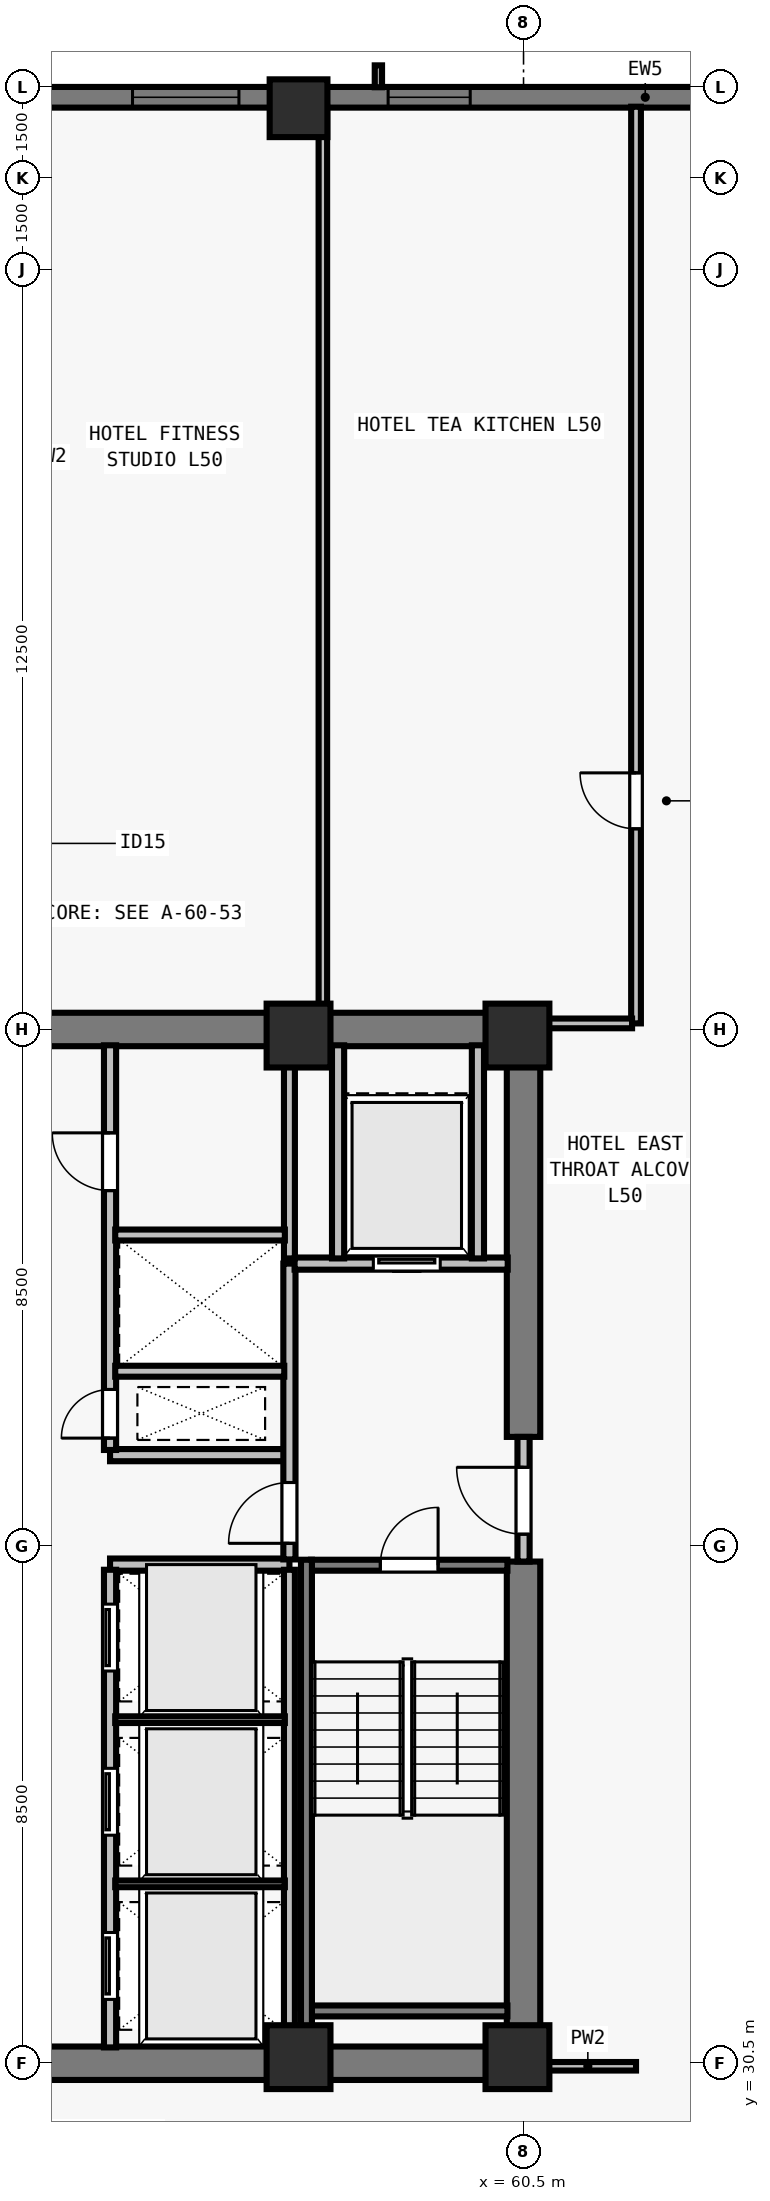
"""IFC4 building model, lengths in metres.
Left out: names, types, materials, properties, quantities, classifications, styles, units other than length and angle.
Written with IfcOpenShell. Run it as: python <this file> out.ifc"""

import sys

from ifc_helpers import new_model, si_unit, direction, frame, frame_2d, origin, origin_2d, place, context, subcontext, project, spatial, rectangle, extrude, element, fill, save


model = new_model("IFC4")
c1 = context("Model", 3, precision=1e-05, world=origin(), true_north=direction((0.0, 1.0)))
c2 = subcontext(c1, "Body", "Model", "MODEL_VIEW")
j1 = project(units=[si_unit("LENGTHUNIT", "METRE"), si_unit("PLANEANGLEUNIT", "RADIAN")], contexts=[c1])
p1 = place(None, origin())
s1 = spatial("IfcSite", under=j1, at=p1, CompositionType="ELEMENT")
p2 = place(p1, origin())
s2 = spatial("IfcBuilding", under=s1, at=p2, CompositionType="ELEMENT")
p3 = place(p2, frame((0.0, 0.0, 183.0)))
s3 = spatial("IfcBuildingStorey", under=s2, at=p3, CompositionType="ELEMENT", Elevation=183.0)
for number, where, z_axis, x_axis in (
    (1, (56.8, 30.6, 0.0), (0.0, 0.0, 1.0), (1.0, 0.0, 0.0)),
    (2, (60.4, 30.6, 0.0), (0.0, 0.0, 1.0), (1.0, 0.0, 0.0)),
    (3, (56.8, 47.4, 0.0), (0.0, 0.0, 1.0), (1.0, 0.0, 0.0)),
    (4, (60.4, 47.4, 0.0), (0.0, 0.0, 1.0), (1.0, 0.0, 0.0)),
):
    element("IfcColumn", number, at=place(p3, frame(where, z_axis=z_axis, x_axis=x_axis)), inside=s3, PredefinedType="COLUMN", context=c2, shape_type="SweptSolid", body=[
        extrude(rectangle(XDim=1.05, YDim=1.05, at=origin_2d()), origin(), (0.0, 0.0, 1.0), 3.5),
    ])
p4 = place(p3, frame((56.8, 62.65, 0.0), z_axis=(0.0, 0.0, 1.0), x_axis=(1.0, 0.0, 0.0)))
e5 = element("IfcColumn", 5, at=p4, inside=s3, PredefinedType="COLUMN", context=c2, shape_type="SweptSolid", body=[
    extrude(rectangle(XDim=0.95, YDim=0.95, at=origin_2d()), origin(), (0.0, 0.0, 1.0), 3.5),
])
p5 = place(p3, frame((32.0, 62.83, 0.0), z_axis=(0.0, 0.0, 1.0), x_axis=(1.0, 0.0, 0.0)))
e6 = element("IfcWall", 6, at=p5, inside=s3, PredefinedType="SOLIDWALL", context=c2, shape_type="SweptSolid", body=[
    extrude(rectangle(XDim=39.682, YDim=0.34, at=frame_2d((19.841, 0.0))), origin(), (0.0, 0.0, 1.0), 3.28),
])
p6 = place(p5, frame((4.102, 0.0, 0.8)))
e7 = element("IfcOpeningElement", 7, at=p6, cuts=e6, PredefinedType="OPENING", context=c2, shape_type="SweptSolid", body=[
    extrude(rectangle(XDim=1.35, YDim=1.66, at=frame_2d((0.675, 0.83))), frame((0.0, 0.18, 0.0), z_axis=(0.0, -1.0, 0.0), x_axis=(1.0, 0.0, 0.0)), (0.0, 0.0, 1.0), 0.36),
])
p7 = place(p5, frame((8.755, 0.0, 0.8)))
e8 = element("IfcOpeningElement", 8, at=p7, cuts=e6, PredefinedType="OPENING", context=c2, shape_type="SweptSolid", body=[
    extrude(rectangle(XDim=1.75, YDim=1.66, at=frame_2d((0.875, 0.83))), frame((0.0, 0.18, 0.0), z_axis=(0.0, -1.0, 0.0), x_axis=(1.0, 0.0, 0.0)), (0.0, 0.0, 1.0), 0.36),
])
p8 = place(p5, frame((12.059, 0.0, 0.8)))
e9 = element("IfcOpeningElement", 9, at=p8, cuts=e6, PredefinedType="OPENING", context=c2, shape_type="SweptSolid", body=[
    extrude(rectangle(XDim=1.35, YDim=1.66, at=frame_2d((0.675, 0.83))), frame((0.0, 0.18, 0.0), z_axis=(0.0, -1.0, 0.0), x_axis=(1.0, 0.0, 0.0)), (0.0, 0.0, 1.0), 0.36),
])
p9 = place(p5, frame((16.262, 0.0, 0.8)))
e10 = element("IfcOpeningElement", 10, at=p9, cuts=e6, PredefinedType="OPENING", context=c2, shape_type="SweptSolid", body=[
    extrude(rectangle(XDim=1.75, YDim=1.66, at=frame_2d((0.875, 0.83))), frame((0.0, 0.18, 0.0), z_axis=(0.0, -1.0, 0.0), x_axis=(1.0, 0.0, 0.0)), (0.0, 0.0, 1.0), 0.36),
])
p10 = place(p5, frame((18.316, 0.0, 0.8)))
e11 = element("IfcOpeningElement", 11, at=p10, cuts=e6, PredefinedType="OPENING", context=c2, shape_type="SweptSolid", body=[
    extrude(rectangle(XDim=1.35, YDim=1.66, at=frame_2d((0.675, 0.83))), frame((0.0, 0.18, 0.0), z_axis=(0.0, -1.0, 0.0), x_axis=(1.0, 0.0, 0.0)), (0.0, 0.0, 1.0), 0.36),
])
p11 = place(p5, frame((22.07, 0.0, 0.8)))
e12 = element("IfcOpeningElement", 12, at=p11, cuts=e6, PredefinedType="OPENING", context=c2, shape_type="SweptSolid", body=[
    extrude(rectangle(XDim=1.75, YDim=1.66, at=frame_2d((0.875, 0.83))), frame((0.0, 0.18, 0.0), z_axis=(0.0, -1.0, 0.0), x_axis=(1.0, 0.0, 0.0)), (0.0, 0.0, 1.0), 0.36),
])
p12 = place(p5, frame((26.273, 0.0, 0.8)))
e13 = element("IfcOpeningElement", 13, at=p12, cuts=e6, PredefinedType="OPENING", context=c2, shape_type="SweptSolid", body=[
    extrude(rectangle(XDim=1.35, YDim=1.66, at=frame_2d((0.675, 0.83))), frame((0.0, 0.18, 0.0), z_axis=(0.0, -1.0, 0.0), x_axis=(1.0, 0.0, 0.0)), (0.0, 0.0, 1.0), 0.36),
])
p13 = place(p5, frame((33.38, 0.0, 0.8)))
e14 = element("IfcOpeningElement", 14, at=p13, cuts=e6, PredefinedType="OPENING", context=c2, shape_type="SweptSolid", body=[
    extrude(rectangle(XDim=1.35, YDim=1.66, at=frame_2d((0.675, 0.83))), frame((0.0, 0.18, 0.0), z_axis=(0.0, -1.0, 0.0), x_axis=(1.0, 0.0, 0.0)), (0.0, 0.0, 1.0), 0.36),
])
for number, where, z_axis, x_axis in (
    (15, (43.225, 30.5, 0.0), (0.0, 0.0, 1.0), (1.0, 0.0, 0.0)),
    (16, (43.225, 47.5, 0.0), (0.0, 0.0, 1.0), (1.0, 0.0, 0.0)),
):
    element("IfcWall", number, at=place(p3, frame(where, z_axis=z_axis, x_axis=x_axis)), inside=s3, PredefinedType="SHEAR", context=c2, shape_type="SweptSolid", body=[
        extrude(rectangle(XDim=17.55, YDim=0.55, at=frame_2d((8.775, 0.0))), origin(), (0.0, 0.0, 1.0), 3.28),
    ])
p14 = place(p3, frame((60.5, 30.765, 0.0), z_axis=(0.0, 0.0, 1.0), x_axis=(0.0, 1.0, 0.0)))
e17 = element("IfcWall", 17, at=p14, inside=s3, PredefinedType="SHEAR", context=c2, shape_type="SweptSolid", body=[
    extrude(rectangle(XDim=7.985, YDim=0.55, at=frame_2d((3.993, 0.0))), origin(), (0.0, 0.0, 1.0), 3.28),
])
p15 = place(p3, frame((60.5, 40.8, 0.0), z_axis=(0.0, 0.0, 1.0), x_axis=(0.0, 1.0, 0.0)))
e18 = element("IfcWall", 18, at=p15, inside=s3, PredefinedType="SHEAR", context=c2, shape_type="SweptSolid", body=[
    extrude(rectangle(XDim=6.435, YDim=0.55, at=frame_2d((3.218, 0.0))), origin(), (0.0, 0.0, 1.0), 3.28),
])
for number, where, z_axis, x_axis in (
    (19, (53.7, 38.7, 0.0), (0.0, 0.0, 1.0), (1.0, 0.0, 0.0)),
    (20, (53.7, 40.5, 0.0), (0.0, 0.0, 1.0), (1.0, 0.0, 0.0)),
):
    element("IfcWall", number, at=place(p3, frame(where, z_axis=z_axis, x_axis=x_axis)), inside=s3, PredefinedType="SOLIDWALL", context=c2, shape_type="SweptSolid", body=[
        extrude(rectangle(XDim=2.95, YDim=0.2, at=frame_2d((1.475, 0.0))), origin(), (0.0, 0.0, 1.0), 3.28),
    ])
p16 = place(p3, frame((53.7, 30.76, 0.0), z_axis=(0.0, 0.0, 1.0), x_axis=(0.0, 1.0, 0.0)))
e21 = element("IfcWall", 21, at=p16, inside=s3, PredefinedType="SOLIDWALL", context=c2, shape_type="SweptSolid", body=[
    extrude(rectangle(XDim=7.855, YDim=0.2, at=frame_2d((3.927, 0.0))), origin(), (0.0, 0.0, 1.0), 3.28),
])
p17 = place(p16, frame((0.79, 0.0, 0.0)))
e22 = element("IfcOpeningElement", 22, at=p17, cuts=e21, PredefinedType="OPENING", context=c2, shape_type="SweptSolid", body=[
    extrude(rectangle(XDim=1.1, YDim=2.2, at=frame_2d((0.55, 1.1))), frame((0.0, 0.11, 0.0), z_axis=(0.0, -1.0, 0.0), x_axis=(1.0, 0.0, 0.0)), (0.0, 0.0, 1.0), 0.22),
])
p18 = place(p16, frame((3.49, 0.0, 0.0)))
e23 = element("IfcOpeningElement", 23, at=p18, cuts=e21, PredefinedType="OPENING", context=c2, shape_type="SweptSolid", body=[
    extrude(rectangle(XDim=1.1, YDim=2.2, at=frame_2d((0.55, 1.1))), frame((0.0, 0.11, 0.0), z_axis=(0.0, -1.0, 0.0), x_axis=(1.0, 0.0, 0.0)), (0.0, 0.0, 1.0), 0.22),
])
p19 = place(p16, frame((6.19, 0.0, 0.0)))
e24 = element("IfcOpeningElement", 24, at=p19, cuts=e21, PredefinedType="OPENING", context=c2, shape_type="SweptSolid", body=[
    extrude(rectangle(XDim=1.1, YDim=2.2, at=frame_2d((0.55, 1.1))), frame((0.0, 0.11, 0.0), z_axis=(0.0, -1.0, 0.0), x_axis=(1.0, 0.0, 0.0)), (0.0, 0.0, 1.0), 0.22),
])
p20 = place(p3, frame((53.7, 40.585, 0.0), z_axis=(0.0, 0.0, 1.0), x_axis=(0.0, 1.0, 0.0)))
e25 = element("IfcWall", 25, at=p20, inside=s3, PredefinedType="SOLIDWALL", context=c2, shape_type="SweptSolid", body=[
    extrude(rectangle(XDim=6.655, YDim=0.2, at=frame_2d((3.328, 0.0))), origin(), (0.0, 0.0, 1.0), 3.28),
])
p21 = place(p20, frame((0.195, 0.0, 0.0)))
e26 = element("IfcOpeningElement", 26, at=p21, cuts=e25, PredefinedType="OPENING", context=c2, shape_type="SweptSolid", body=[
    extrude(rectangle(XDim=0.8, YDim=2.08, at=frame_2d((0.4, 1.04))), frame((0.0, 0.11, 0.0), z_axis=(0.0, -1.0, 0.0), x_axis=(1.0, 0.0, 0.0)), (0.0, 0.0, 1.0), 0.22),
])
p22 = place(p20, frame((4.265, 0.0, 0.0)))
e27 = element("IfcOpeningElement", 27, at=p22, cuts=e25, PredefinedType="OPENING", context=c2, shape_type="SweptSolid", body=[
    extrude(rectangle(XDim=0.95, YDim=2.12, at=frame_2d((0.475, 1.06))), frame((0.0, 0.11, 0.0), z_axis=(0.0, -1.0, 0.0), x_axis=(1.0, 0.0, 0.0)), (0.0, 0.0, 1.0), 0.22),
])
p23 = place(p3, frame((60.5, 38.75, 0.0), z_axis=(0.0, 0.0, 1.0), x_axis=(0.0, 1.0, 0.0)))
e28 = element("IfcWall", 28, at=p23, inside=s3, PredefinedType="SOLIDWALL", context=c2, shape_type="SweptSolid", body=[
    extrude(rectangle(XDim=2.05, YDim=0.2, at=frame_2d((1.025, 0.0))), origin(), (0.0, 0.0, 1.0), 3.28),
])
p24 = place(p23, frame((0.45, 0.0, 0.0)))
e29 = element("IfcOpeningElement", 29, at=p24, cuts=e28, PredefinedType="OPENING", context=c2, shape_type="SweptSolid", body=[
    extrude(rectangle(XDim=1.1, YDim=2.15, at=frame_2d((0.55, 1.075))), frame((0.0, 0.11, 0.0), z_axis=(0.0, -1.0, 0.0), x_axis=(1.0, 0.0, 0.0)), (0.0, 0.0, 1.0), 0.22),
])
p25 = place(p3, frame((56.65, 38.785, 0.0), z_axis=(0.0, 0.0, 1.0), x_axis=(0.0, 1.0, 0.0)))
e30 = element("IfcWall", 30, at=p25, inside=s3, PredefinedType="SOLIDWALL", context=c2, shape_type="SweptSolid", body=[
    extrude(rectangle(XDim=4.865, YDim=0.2, at=frame_2d((2.433, 0.0))), origin(), (0.0, 0.0, 1.0), 3.28),
])
p26 = place(p25, frame((0.265, 0.0, 0.0)))
e31 = element("IfcOpeningElement", 31, at=p26, cuts=e30, PredefinedType="OPENING", context=c2, shape_type="SweptSolid", body=[
    extrude(rectangle(XDim=1.0, YDim=2.15, at=frame_2d((0.5, 1.075))), frame((0.0, 0.11, 0.0), z_axis=(0.0, -1.0, 0.0), x_axis=(1.0, 0.0, 0.0)), (0.0, 0.0, 1.0), 0.22),
])
p27 = place(p3, frame((56.735, 43.65, 0.0), z_axis=(0.0, 0.0, 1.0), x_axis=(1.0, 0.0, 0.0)))
e32 = element("IfcWall", 32, at=p27, inside=s3, PredefinedType="SOLIDWALL", context=c2, shape_type="SweptSolid", body=[
    extrude(rectangle(XDim=3.505, YDim=0.2, at=frame_2d((1.752, 0.0))), origin(), (0.0, 0.0, 1.0), 3.28),
])
p28 = place(p27, frame((1.295, 0.0, 0.0)))
e33 = element("IfcOpeningElement", 33, at=p28, cuts=e32, PredefinedType="OPENING", context=c2, shape_type="SweptSolid", body=[
    extrude(rectangle(XDim=1.1, YDim=2.2, at=frame_2d((0.55, 1.1))), frame((0.0, 0.11, 0.0), z_axis=(0.0, -1.0, 0.0), x_axis=(1.0, 0.0, 0.0)), (0.0, 0.0, 1.0), 0.22),
])
for number, where, z_axis, x_axis in (
    (34, (57.45, 43.735, 0.0), (0.0, 0.0, 1.0), (0.0, 1.0, 0.0)),
    (35, (59.75, 43.735, 0.0), (0.0, 0.0, 1.0), (0.0, 1.0, 0.0)),
):
    element("IfcWall", number, at=place(p3, frame(where, z_axis=z_axis, x_axis=x_axis)), inside=s3, PredefinedType="SOLIDWALL", context=c2, shape_type="SweptSolid", body=[
        extrude(rectangle(XDim=3.505, YDim=0.2, at=frame_2d((1.752, 0.0))), origin(), (0.0, 0.0, 1.0), 3.28),
    ])
p29 = place(p3, frame((56.65, 30.76, 0.0), z_axis=(0.0, 0.0, 1.0), x_axis=(0.0, 1.0, 0.0)))
e36 = element("IfcWall", 36, at=p29, inside=s3, PredefinedType="SOLIDWALL", context=c2, shape_type="SweptSolid", body=[
    extrude(rectangle(XDim=7.855, YDim=0.18, at=frame_2d((3.927, 0.0))), origin(), (0.0, 0.0, 1.0), 3.28),
])
for number, where, z_axis, x_axis in (
    (37, (53.785, 33.45, 0.0), (0.0, 0.0, 1.0), (1.0, 0.0, 0.0)),
    (38, (53.785, 36.15, 0.0), (0.0, 0.0, 1.0), (1.0, 0.0, 0.0)),
):
    element("IfcWall", number, at=place(p3, frame(where, z_axis=z_axis, x_axis=x_axis)), inside=s3, PredefinedType="PARTITIONING", context=c2, shape_type="SweptSolid", body=[
        extrude(rectangle(XDim=2.79, YDim=0.11, at=frame_2d((1.395, 0.0))), origin(), (0.0, 0.0, 1.0), 3.28),
    ])
p30 = place(p3, frame((56.65, 43.735, 0.0), z_axis=(0.0, 0.0, 1.0), x_axis=(0.0, 1.0, 0.0)))
e39 = element("IfcWall", 39, at=p30, inside=s3, PredefinedType="SOLIDWALL", context=c2, shape_type="SweptSolid", body=[
    extrude(rectangle(XDim=3.505, YDim=0.18, at=frame_2d((1.752, 0.0))), origin(), (0.0, 0.0, 1.0), 3.28),
])
p31 = place(p3, frame((53.785, 41.88, 0.0), z_axis=(0.0, 0.0, 1.0), x_axis=(1.0, 0.0, 0.0)))
e40 = element("IfcWall", 40, at=p31, inside=s3, PredefinedType="SOLIDWALL", context=c2, shape_type="SweptSolid", body=[
    extrude(rectangle(XDim=2.78, YDim=0.18, at=frame_2d((1.39, 0.0))), origin(), (0.0, 0.0, 1.0), 3.28),
])
p32 = place(p3, frame((53.785, 44.12, 0.0), z_axis=(0.0, 0.0, 1.0), x_axis=(1.0, 0.0, 0.0)))
e41 = element("IfcWall", 41, at=p32, inside=s3, PredefinedType="SOLIDWALL", context=c2, shape_type="SweptSolid", body=[
    extrude(rectangle(XDim=2.79, YDim=0.18, at=frame_2d((1.395, 0.0))), origin(), (0.0, 0.0, 1.0), 3.28),
])
p33 = place(p3, frame((62.35, 47.6, 0.0), z_axis=(0.0, 0.0, 1.0), x_axis=(0.0, 1.0, 0.0)))
e42 = element("IfcWall", 42, at=p33, inside=s3, PredefinedType="PARTITIONING", context=c2, shape_type="SweptSolid", body=[
    extrude(rectangle(XDim=15.075, YDim=0.16, at=frame_2d((7.538, 0.0))), origin(), (0.0, 0.0, 1.0), 2.555),
])
p34 = place(p33, frame((3.2, 0.0, 0.0)))
e43 = element("IfcOpeningElement", 43, at=p34, cuts=e42, PredefinedType="OPENING", context=c2, shape_type="SweptSolid", body=[
    extrude(rectangle(XDim=0.92, YDim=2.12, at=frame_2d((0.46, 1.06))), frame((0.0, 0.09, 0.0), z_axis=(0.0, -1.0, 0.0), x_axis=(1.0, 0.0, 0.0)), (0.0, 0.0, 1.0), 0.18),
])
p35 = place(p3, frame((60.765, 30.45, 0.0), z_axis=(0.0, 0.0, 1.0), x_axis=(1.0, 0.0, 0.0)))
e44 = element("IfcWall", 44, at=p35, inside=s3, PredefinedType="PARTITIONING", context=c2, shape_type="SweptSolid", body=[
    extrude(rectangle(XDim=1.585, YDim=0.14, at=frame_2d((0.792, 0.0))), origin(), (0.0, 0.0, 1.0), 3.28),
])
p36 = place(p3, frame((60.765, 47.6, 0.0), z_axis=(0.0, 0.0, 1.0), x_axis=(1.0, 0.0, 0.0)))
e45 = element("IfcWall", 45, at=p36, inside=s3, PredefinedType="PARTITIONING", context=c2, shape_type="SweptSolid", body=[
    extrude(rectangle(XDim=1.52, YDim=0.16, at=frame_2d((0.76, 0.0))), origin(), (0.0, 0.0, 1.0), 3.28),
])
p37 = place(p3, frame((57.2, 47.76, 0.0), z_axis=(0.0, 0.0, 1.0), x_axis=(0.0, 1.0, 0.0)))
e46 = element("IfcWall", 46, at=p37, inside=s3, PredefinedType="PARTITIONING", context=c2, shape_type="SweptSolid", body=[
    extrude(rectangle(XDim=14.915, YDim=0.14, at=frame_2d((7.458, 0.0))), origin(), (0.0, 0.0, 1.0), 3.28),
])
p38 = place(p3, frame((57.005, 38.69, 0.0), z_axis=(0.0, 0.0, 1.0), x_axis=(1.0, 0.0, 0.0)))
e47 = element("IfcWall", 47, at=p38, inside=s3, PredefinedType="SOLIDWALL", context=c2, shape_type="SweptSolid", body=[
    extrude(rectangle(XDim=3.23, YDim=0.18, at=frame_2d((1.615, 0.0))), origin(), (0.0, 0.0, 1.0), 3.28),
])
p39 = place(p38, frame((1.14, 0.0, 0.0)))
e48 = element("IfcOpeningElement", 48, at=p39, cuts=e47, PredefinedType="OPENING", context=c2, shape_type="SweptSolid", body=[
    extrude(rectangle(XDim=0.95, YDim=2.15, at=frame_2d((0.475, 1.075))), frame((0.0, 0.1, 0.0), z_axis=(0.0, -1.0, 0.0), x_axis=(1.0, 0.0, 0.0)), (0.0, 0.0, 1.0), 0.2),
])
p40 = place(p3, frame((57.005, 31.36, 0.0), z_axis=(0.0, 0.0, 1.0), x_axis=(1.0, 0.0, 0.0)))
e49 = element("IfcWall", 49, at=p40, inside=s3, PredefinedType="SOLIDWALL", context=c2, shape_type="SweptSolid", body=[
    extrude(rectangle(XDim=3.23, YDim=0.18, at=frame_2d((1.615, 0.0))), origin(), (0.0, 0.0, 1.0), 3.28),
])
p41 = place(p3, frame((56.93, 38.78, 0.0), z_axis=(0.0, 0.0, 1.0), x_axis=(0.0, -1.0, 0.0)))
e50 = element("IfcWall", 50, at=p41, inside=s3, PredefinedType="SOLIDWALL", context=c2, shape_type="SweptSolid", body=[
    extrude(rectangle(XDim=8.017, YDim=0.18, at=frame_2d((4.009, 0.0))), origin(), (0.0, 0.0, 1.0), 3.28),
])
p42 = place(p11, origin())
e51 = element("IfcWindow", 51, at=p42, inside=s3, PartitioningType="SINGLE_PANEL", PredefinedType="WINDOW", context=c2, shape_type="SweptSolid", body=[
    extrude(rectangle(XDim=1.75, YDim=1.66, at=frame_2d((0.875, 0.83))), frame((0.0, -0.05, 0.0), z_axis=(0.0, -1.0, 0.0), x_axis=(1.0, 0.0, 0.0)), (0.0, 0.0, 1.0), 0.06),
])
fill(e12, e51)
p43 = place(p12, origin())
e52 = element("IfcWindow", 52, at=p43, inside=s3, PartitioningType="SINGLE_PANEL", PredefinedType="WINDOW", context=c2, shape_type="SweptSolid", body=[
    extrude(rectangle(XDim=1.35, YDim=1.66, at=frame_2d((0.675, 0.83))), frame((0.0, -0.05, 0.0), z_axis=(0.0, -1.0, 0.0), x_axis=(1.0, 0.0, 0.0)), (0.0, 0.0, 1.0), 0.06),
])
fill(e13, e52)
p44 = place(p24, origin())
e53 = element("IfcDoor", 53, at=p44, inside=s3, OperationType="SINGLE_SWING_RIGHT", PredefinedType="DOOR", context=c2, shape_type="SweptSolid", body=[
    extrude(rectangle(XDim=1.1, YDim=2.15, at=frame_2d((0.55, 1.075))), frame((0.0, 0.025, 0.0), z_axis=(0.0, -1.0, 0.0), x_axis=(1.0, 0.0, 0.0)), (0.0, 0.0, 1.0), 0.05),
])
fill(e29, e53)
p45 = place(p26, origin())
e54 = element("IfcDoor", 54, at=p45, inside=s3, OperationType="SINGLE_SWING_LEFT", PredefinedType="DOOR", context=c2, shape_type="SweptSolid", body=[
    extrude(rectangle(XDim=1.0, YDim=2.15, at=frame_2d((0.5, 1.075))), frame((0.0, 0.025, 0.0), z_axis=(0.0, -1.0, 0.0), x_axis=(1.0, 0.0, 0.0)), (0.0, 0.0, 1.0), 0.05),
])
fill(e31, e54)
p46 = place(p28, origin())
e55 = element("IfcDoor", 55, at=p46, inside=s3, OperationType="SLIDING_TO_LEFT", PredefinedType="DOOR", context=c2, shape_type="SweptSolid", body=[
    extrude(rectangle(XDim=1.1, YDim=2.2, at=frame_2d((0.55, 1.1))), frame((0.0, 0.025, 0.0), z_axis=(0.0, -1.0, 0.0), x_axis=(1.0, 0.0, 0.0)), (0.0, 0.0, 1.0), 0.05),
])
fill(e33, e55)
p47 = place(p17, origin())
e56 = element("IfcDoor", 56, at=p47, inside=s3, OperationType="SLIDING_TO_LEFT", PredefinedType="DOOR", context=c2, shape_type="SweptSolid", body=[
    extrude(rectangle(XDim=1.1, YDim=2.2, at=frame_2d((0.55, 1.1))), frame((0.0, 0.025, 0.0), z_axis=(0.0, -1.0, 0.0), x_axis=(1.0, 0.0, 0.0)), (0.0, 0.0, 1.0), 0.05),
])
fill(e22, e56)
p48 = place(p18, origin())
e57 = element("IfcDoor", 57, at=p48, inside=s3, OperationType="SLIDING_TO_LEFT", PredefinedType="DOOR", context=c2, shape_type="SweptSolid", body=[
    extrude(rectangle(XDim=1.1, YDim=2.2, at=frame_2d((0.55, 1.1))), frame((0.0, 0.025, 0.0), z_axis=(0.0, -1.0, 0.0), x_axis=(1.0, 0.0, 0.0)), (0.0, 0.0, 1.0), 0.05),
])
fill(e23, e57)
p49 = place(p19, origin())
e58 = element("IfcDoor", 58, at=p49, inside=s3, OperationType="SLIDING_TO_LEFT", PredefinedType="DOOR", context=c2, shape_type="SweptSolid", body=[
    extrude(rectangle(XDim=1.1, YDim=2.2, at=frame_2d((0.55, 1.1))), frame((0.0, 0.025, 0.0), z_axis=(0.0, -1.0, 0.0), x_axis=(1.0, 0.0, 0.0)), (0.0, 0.0, 1.0), 0.05),
])
fill(e24, e58)
p50 = place(p21, origin())
e59 = element("IfcDoor", 59, at=p50, inside=s3, OperationType="SINGLE_SWING_LEFT", PredefinedType="DOOR", context=c2, shape_type="SweptSolid", body=[
    extrude(rectangle(XDim=0.8, YDim=2.08, at=frame_2d((0.4, 1.04))), frame((0.0, 0.025, 0.0), z_axis=(0.0, -1.0, 0.0), x_axis=(1.0, 0.0, 0.0)), (0.0, 0.0, 1.0), 0.05),
])
fill(e26, e59)
p51 = place(p22, origin())
e60 = element("IfcDoor", 60, at=p51, inside=s3, OperationType="SINGLE_SWING_RIGHT", PredefinedType="DOOR", context=c2, shape_type="SweptSolid", body=[
    extrude(rectangle(XDim=0.95, YDim=2.12, at=frame_2d((0.475, 1.06))), frame((0.0, 0.025, 0.0), z_axis=(0.0, -1.0, 0.0), x_axis=(1.0, 0.0, 0.0)), (0.0, 0.0, 1.0), 0.05),
])
fill(e27, e60)
p52 = place(p34, origin())
e61 = element("IfcDoor", 61, at=p52, inside=s3, OperationType="SINGLE_SWING_RIGHT", PredefinedType="DOOR", context=c2, shape_type="SweptSolid", body=[
    extrude(rectangle(XDim=0.92, YDim=2.12, at=frame_2d((0.46, 1.06))), frame((0.0, 0.025, 0.0), z_axis=(0.0, -1.0, 0.0), x_axis=(1.0, 0.0, 0.0)), (0.0, 0.0, 1.0), 0.05),
])
fill(e43, e61)
p53 = place(p39, origin())
e62 = element("IfcDoor", 62, at=p53, inside=s3, OperationType="SINGLE_SWING_RIGHT", PredefinedType="DOOR", context=c2, shape_type="SweptSolid", body=[
    extrude(rectangle(XDim=0.95, YDim=2.15, at=frame_2d((0.475, 1.075))), frame((0.0, 0.025, 0.0), z_axis=(0.0, -1.0, 0.0), x_axis=(1.0, 0.0, 0.0)), (0.0, 0.0, 1.0), 0.05),
])
fill(e48, e62)
save(model, sys.argv[1])
